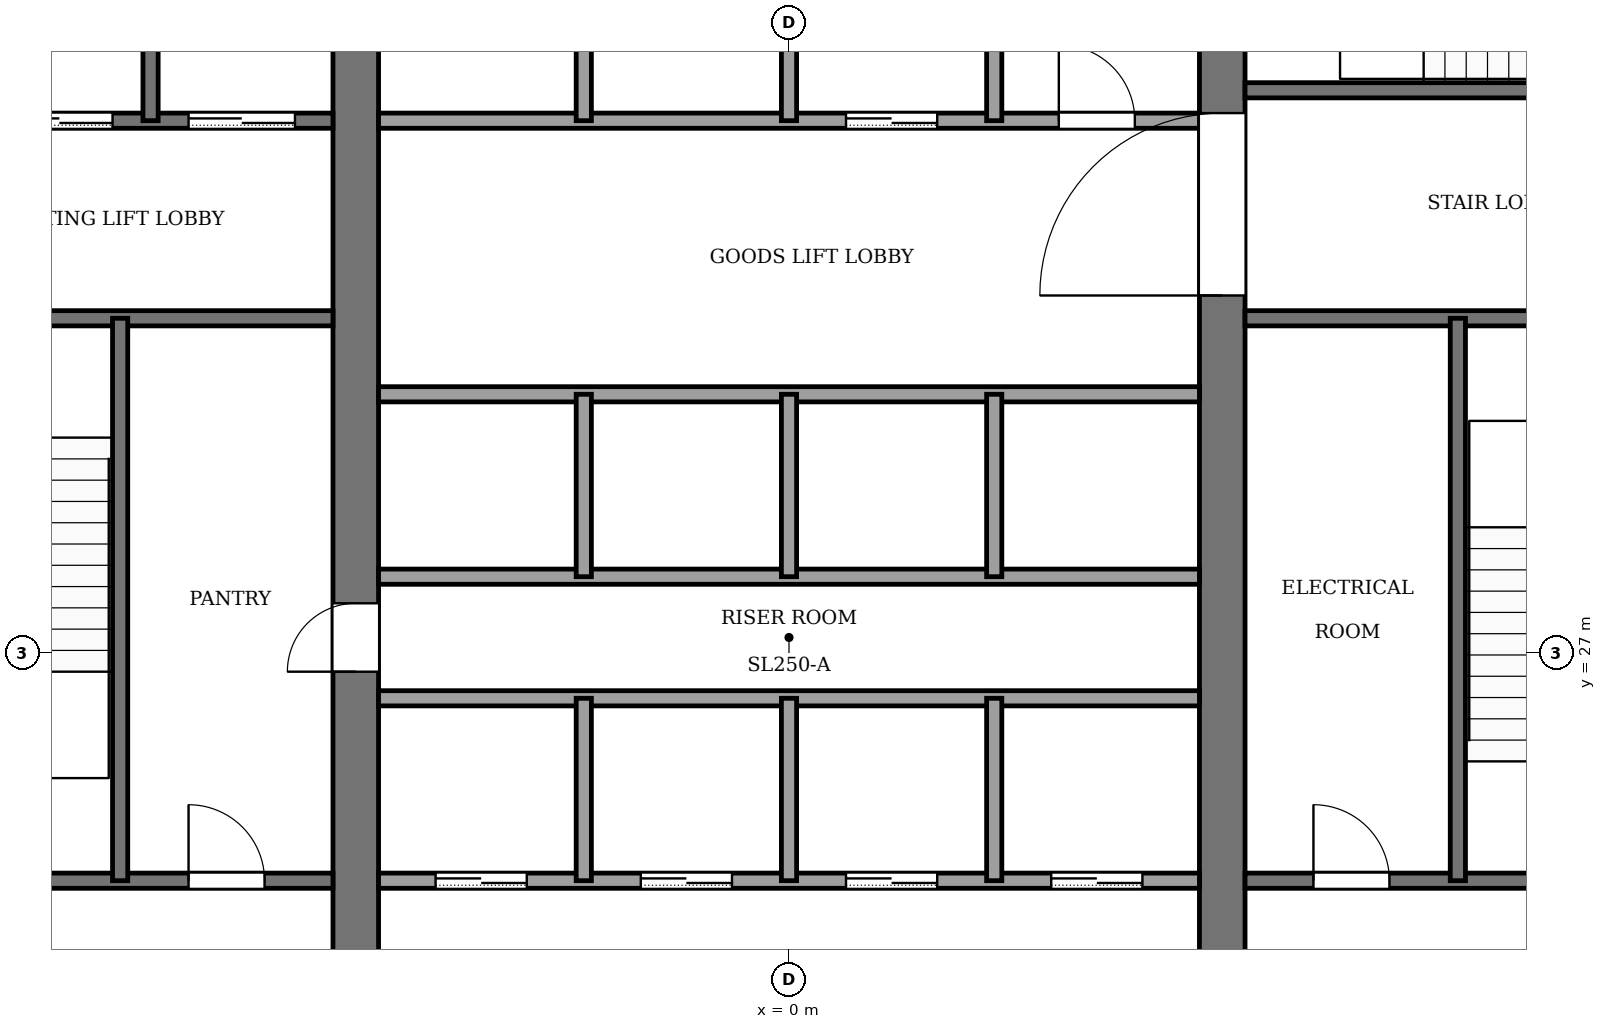
"""IFC4 building model, lengths in metres.
Left out: names, types, materials, properties, quantities, classifications, styles, units other than length and angle.
Written with IfcOpenShell. Run it as: python <this file> out.ifc"""

import sys

from ifc_helpers import new_model, si_unit, direction, frame, frame_2d, origin, place, context, subcontext, project, spatial, rectangle, extrude, element, fill, save


model = new_model("IFC4")
c1 = context("Model", 3, precision=1e-05, world=origin(), true_north=direction((0.0, 1.0)))
c2 = subcontext(c1, "Body", "Model", "MODEL_VIEW")
j1 = project(units=[si_unit("LENGTHUNIT", "METRE"), si_unit("PLANEANGLEUNIT", "RADIAN")], contexts=[c1])
p1 = place(None, origin())
s1 = spatial("IfcSite", under=j1, at=p1, CompositionType="ELEMENT")
p2 = place(p1, origin())
s2 = spatial("IfcBuilding", under=s1, at=p2, CompositionType="ELEMENT")
p3 = place(p2, frame((0.0, 0.0, 14.0)))
s3 = spatial("IfcBuildingStorey", under=s2, at=p3, CompositionType="ELEMENT", Elevation=14.0)
p4 = place(p3, frame((-5.7, 18.4, -0.13), z_axis=(0.0, 0.0, 1.0), x_axis=(0.0, 1.0, 0.0)))
e1 = element("IfcWall", 1, at=p4, inside=s3, PredefinedType="SHEAR", context=c2, shape_type="SweptSolid", body=[
    extrude(rectangle(XDim=19.2, YDim=0.6, at=frame_2d((9.6, 0.0))), origin(), (0.0, 0.0, 1.0), 4.0),
])
p5 = place(p4, frame((8.35, 0.0, 0.13)))
e2 = element("IfcOpeningElement", 2, at=p5, cuts=e1, PredefinedType="OPENING", context=c2, shape_type="SweptSolid", body=[
    extrude(rectangle(XDim=0.9, YDim=2.1, at=frame_2d((0.45, 1.05))), frame((0.0, 0.31, 0.0), z_axis=(0.0, -1.0, 0.0), x_axis=(1.0, 0.0, 0.0)), (0.0, 0.0, 1.0), 0.62),
])
p6 = place(p3, frame((5.7, 18.4, -0.13), z_axis=(0.0, 0.0, 1.0), x_axis=(0.0, 1.0, 0.0)))
e3 = element("IfcWall", 3, at=p6, inside=s3, PredefinedType="SHEAR", context=c2, shape_type="SweptSolid", body=[
    extrude(rectangle(XDim=19.2, YDim=0.6, at=frame_2d((9.6, 0.0))), origin(), (0.0, 0.0, 1.0), 4.0),
])
p7 = place(p6, frame((13.3, 0.0, 0.13)))
e4 = element("IfcOpeningElement", 4, at=p7, cuts=e3, PredefinedType="OPENING", context=c2, shape_type="SweptSolid", body=[
    extrude(rectangle(XDim=2.4, YDim=2.4, at=frame_2d((1.2, 1.2))), frame((0.0, 0.31, 0.0), z_axis=(0.0, -1.0, 0.0), x_axis=(1.0, 0.0, 0.0)), (0.0, 0.0, 1.0), 0.62),
])
p8 = place(p3, frame((-12.6, 24.0, 0.0), z_axis=(0.0, 0.0, 1.0), x_axis=(1.0, 0.0, 0.0)))
e5 = element("IfcWall", 5, at=p8, inside=s3, PredefinedType="PARTITIONING", context=c2, shape_type="SweptSolid", body=[
    extrude(rectangle(XDim=6.6, YDim=0.2, at=frame_2d((3.3, 0.0))), origin(), (0.0, 0.0, 1.0), 3.87),
])
p9 = place(p8, frame((4.7, 0.0, 0.0)))
e6 = element("IfcOpeningElement", 6, at=p9, cuts=e5, PredefinedType="OPENING", context=c2, shape_type="SweptSolid", body=[
    extrude(rectangle(XDim=1.0, YDim=2.1, at=frame_2d((0.5, 1.05))), frame((0.0, 0.11, 0.0), z_axis=(0.0, -1.0, 0.0), x_axis=(1.0, 0.0, 0.0)), (0.0, 0.0, 1.0), 0.22),
])
p10 = place(p3, frame((-5.4, 24.0, 0.0), z_axis=(0.0, 0.0, 1.0), x_axis=(1.0, 0.0, 0.0)))
e7 = element("IfcWall", 7, at=p10, inside=s3, PredefinedType="PARTITIONING", context=c2, shape_type="SweptSolid", body=[
    extrude(rectangle(XDim=10.8, YDim=0.2, at=frame_2d((5.4, 0.0))), origin(), (0.0, 0.0, 1.0), 3.87),
])
p11 = place(p10, frame((0.75, 0.0, 0.0)))
e8 = element("IfcOpeningElement", 8, at=p11, cuts=e7, PredefinedType="OPENING", context=c2, shape_type="SweptSolid", body=[
    extrude(rectangle(XDim=1.2, YDim=2.2, at=frame_2d((0.6, 1.1))), frame((0.0, 0.11, 0.0), z_axis=(0.0, -1.0, 0.0), x_axis=(1.0, 0.0, 0.0)), (0.0, 0.0, 1.0), 0.22),
])
p12 = place(p10, frame((3.45, 0.0, 0.0)))
e9 = element("IfcOpeningElement", 9, at=p12, cuts=e7, PredefinedType="OPENING", context=c2, shape_type="SweptSolid", body=[
    extrude(rectangle(XDim=1.2, YDim=2.2, at=frame_2d((0.6, 1.1))), frame((0.0, 0.11, 0.0), z_axis=(0.0, -1.0, 0.0), x_axis=(1.0, 0.0, 0.0)), (0.0, 0.0, 1.0), 0.22),
])
p13 = place(p10, frame((6.15, 0.0, 0.0)))
e10 = element("IfcOpeningElement", 10, at=p13, cuts=e7, PredefinedType="OPENING", context=c2, shape_type="SweptSolid", body=[
    extrude(rectangle(XDim=1.2, YDim=2.2, at=frame_2d((0.6, 1.1))), frame((0.0, 0.11, 0.0), z_axis=(0.0, -1.0, 0.0), x_axis=(1.0, 0.0, 0.0)), (0.0, 0.0, 1.0), 0.22),
])
p14 = place(p10, frame((8.85, 0.0, 0.0)))
e11 = element("IfcOpeningElement", 11, at=p14, cuts=e7, PredefinedType="OPENING", context=c2, shape_type="SweptSolid", body=[
    extrude(rectangle(XDim=1.2, YDim=2.2, at=frame_2d((0.6, 1.1))), frame((0.0, 0.11, 0.0), z_axis=(0.0, -1.0, 0.0), x_axis=(1.0, 0.0, 0.0)), (0.0, 0.0, 1.0), 0.22),
])
p15 = place(p3, frame((6.0, 24.0, 0.0), z_axis=(0.0, 0.0, 1.0), x_axis=(1.0, 0.0, 0.0)))
e12 = element("IfcWall", 12, at=p15, inside=s3, PredefinedType="PARTITIONING", context=c2, shape_type="SweptSolid", body=[
    extrude(rectangle(XDim=6.6, YDim=0.2, at=frame_2d((3.3, 0.0))), origin(), (0.0, 0.0, 1.0), 3.87),
])
p16 = place(p15, frame((0.9, 0.0, 0.0)))
e13 = element("IfcOpeningElement", 13, at=p16, cuts=e12, PredefinedType="OPENING", context=c2, shape_type="SweptSolid", body=[
    extrude(rectangle(XDim=1.0, YDim=2.1, at=frame_2d((0.5, 1.05))), frame((0.0, 0.11, 0.0), z_axis=(0.0, -1.0, 0.0), x_axis=(1.0, 0.0, 0.0)), (0.0, 0.0, 1.0), 0.22),
])
p17 = place(p15, frame((4.4, 0.0, 0.0)))
e14 = element("IfcOpeningElement", 14, at=p17, cuts=e12, PredefinedType="OPENING", context=c2, shape_type="SweptSolid", body=[
    extrude(rectangle(XDim=1.2, YDim=2.2, at=frame_2d((0.6, 1.1))), frame((0.0, 0.11, 0.0), z_axis=(0.0, -1.0, 0.0), x_axis=(1.0, 0.0, 0.0)), (0.0, 0.0, 1.0), 0.22),
])
for number, where, z_axis, x_axis in (
    (15, (-5.4, 26.4, 0.0), (0.0, 0.0, 1.0), (1.0, 0.0, 0.0)),
    (16, (-5.4, 28.0, 0.0), (0.0, 0.0, 1.0), (1.0, 0.0, 0.0)),
    (17, (-5.4, 30.4, 0.0), (0.0, 0.0, 1.0), (1.0, 0.0, 0.0)),
):
    element("IfcWall", number, at=place(p3, frame(where, z_axis=z_axis, x_axis=x_axis)), inside=s3, PredefinedType="PARTITIONING", context=c2, shape_type="SweptSolid", body=[
        extrude(rectangle(XDim=10.8, YDim=0.2, at=frame_2d((5.4, 0.0))), origin(), (0.0, 0.0, 1.0), 3.87),
    ])
p18 = place(p3, frame((-12.6, 31.4, 0.0), z_axis=(0.0, 0.0, 1.0), x_axis=(1.0, 0.0, 0.0)))
e18 = element("IfcWall", 18, at=p18, inside=s3, PredefinedType="PARTITIONING", context=c2, shape_type="SweptSolid", body=[
    extrude(rectangle(XDim=6.6, YDim=0.2, at=frame_2d((3.3, 0.0))), origin(), (0.0, 0.0, 1.0), 3.87),
])
p19 = place(p18, frame((1.0, 0.0, 0.0)))
e19 = element("IfcOpeningElement", 19, at=p19, cuts=e18, PredefinedType="OPENING", context=c2, shape_type="SweptSolid", body=[
    extrude(rectangle(XDim=1.2, YDim=2.2, at=frame_2d((0.6, 1.1))), frame((0.0, 0.11, 0.0), z_axis=(0.0, -1.0, 0.0), x_axis=(1.0, 0.0, 0.0)), (0.0, 0.0, 1.0), 0.22),
])
p20 = place(p3, frame((6.0, 31.4, 0.0), z_axis=(0.0, 0.0, 1.0), x_axis=(1.0, 0.0, 0.0)))
e20 = element("IfcWall", 20, at=p20, inside=s3, PredefinedType="PARTITIONING", context=c2, shape_type="SweptSolid", body=[
    extrude(rectangle(XDim=6.6, YDim=0.2, at=frame_2d((3.3, 0.0))), origin(), (0.0, 0.0, 1.0), 3.87),
])
p21 = place(p3, frame((-12.6, 34.0, 0.0), z_axis=(0.0, 0.0, 1.0), x_axis=(1.0, 0.0, 0.0)))
e21 = element("IfcWall", 21, at=p21, inside=s3, PredefinedType="PARTITIONING", context=c2, shape_type="SweptSolid", body=[
    extrude(rectangle(XDim=6.6, YDim=0.2, at=frame_2d((3.3, 0.0))), origin(), (0.0, 0.0, 1.0), 3.87),
])
p22 = place(p21, frame((4.7, 0.0, 0.0)))
e22 = element("IfcOpeningElement", 22, at=p22, cuts=e21, PredefinedType="OPENING", context=c2, shape_type="SweptSolid", body=[
    extrude(rectangle(XDim=1.4, YDim=2.2, at=frame_2d((0.7, 1.1))), frame((0.0, 0.11, 0.0), z_axis=(0.0, -1.0, 0.0), x_axis=(1.0, 0.0, 0.0)), (0.0, 0.0, 1.0), 0.22),
])
p23 = place(p21, frame((2.3, 0.0, 0.0)))
e23 = element("IfcOpeningElement", 23, at=p23, cuts=e21, PredefinedType="OPENING", context=c2, shape_type="SweptSolid", body=[
    extrude(rectangle(XDim=1.4, YDim=2.2, at=frame_2d((0.7, 1.1))), frame((0.0, 0.11, 0.0), z_axis=(0.0, -1.0, 0.0), x_axis=(1.0, 0.0, 0.0)), (0.0, 0.0, 1.0), 0.22),
])
p24 = place(p21, frame((0.45, 0.0, 0.0)))
e24 = element("IfcOpeningElement", 24, at=p24, cuts=e21, PredefinedType="OPENING", context=c2, shape_type="SweptSolid", body=[
    extrude(rectangle(XDim=0.9, YDim=2.1, at=frame_2d((0.45, 1.05))), frame((0.0, 0.11, 0.0), z_axis=(0.0, -1.0, 0.0), x_axis=(1.0, 0.0, 0.0)), (0.0, 0.0, 1.0), 0.22),
])
p25 = place(p3, frame((-5.4, 34.0, 0.0), z_axis=(0.0, 0.0, 1.0), x_axis=(1.0, 0.0, 0.0)))
e25 = element("IfcWall", 25, at=p25, inside=s3, PredefinedType="PARTITIONING", context=c2, shape_type="SweptSolid", body=[
    extrude(rectangle(XDim=10.8, YDim=0.2, at=frame_2d((5.4, 0.0))), origin(), (0.0, 0.0, 1.0), 3.87),
])
p26 = place(p25, frame((6.15, 0.0, 0.0)))
e26 = element("IfcOpeningElement", 26, at=p26, cuts=e25, PredefinedType="OPENING", context=c2, shape_type="SweptSolid", body=[
    extrude(rectangle(XDim=1.2, YDim=2.2, at=frame_2d((0.6, 1.1))), frame((0.0, 0.11, 0.0), z_axis=(0.0, -1.0, 0.0), x_axis=(1.0, 0.0, 0.0)), (0.0, 0.0, 1.0), 0.22),
])
p27 = place(p25, frame((8.95, 0.0, 0.0)))
e27 = element("IfcOpeningElement", 27, at=p27, cuts=e25, PredefinedType="OPENING", context=c2, shape_type="SweptSolid", body=[
    extrude(rectangle(XDim=1.0, YDim=2.1, at=frame_2d((0.5, 1.05))), frame((0.0, 0.11, 0.0), z_axis=(0.0, -1.0, 0.0), x_axis=(1.0, 0.0, 0.0)), (0.0, 0.0, 1.0), 0.22),
])
p28 = place(p3, frame((6.0, 34.4, 0.0), z_axis=(0.0, 0.0, 1.0), x_axis=(1.0, 0.0, 0.0)))
e28 = element("IfcWall", 28, at=p28, inside=s3, PredefinedType="PARTITIONING", context=c2, shape_type="SweptSolid", body=[
    extrude(rectangle(XDim=6.6, YDim=0.2, at=frame_2d((3.3, 0.0))), origin(), (0.0, 0.0, 1.0), 3.87),
])
p29 = place(p28, frame((4.8, 0.0, 0.0)))
e29 = element("IfcOpeningElement", 29, at=p29, cuts=e28, PredefinedType="OPENING", context=c2, shape_type="SweptSolid", body=[
    extrude(rectangle(XDim=1.2, YDim=2.2, at=frame_2d((0.6, 1.1))), frame((0.0, 0.11, 0.0), z_axis=(0.0, -1.0, 0.0), x_axis=(1.0, 0.0, 0.0)), (0.0, 0.0, 1.0), 0.22),
])
p30 = place(p3, frame((-8.8, 24.0, 0.0), z_axis=(0.0, 0.0, 1.0), x_axis=(0.0, 1.0, 0.0)))
e30 = element("IfcWall", 30, at=p30, inside=s3, PredefinedType="PARTITIONING", context=c2, shape_type="SweptSolid", body=[
    extrude(rectangle(XDim=7.4, YDim=0.2, at=frame_2d((3.7, 0.0))), origin(), (0.0, 0.0, 1.0), 3.87),
])
p31 = place(p3, frame((-8.4, 34.0, 0.0), z_axis=(0.0, 0.0, 1.0), x_axis=(0.0, 1.0, 0.0)))
e31 = element("IfcWall", 31, at=p31, inside=s3, PredefinedType="PARTITIONING", context=c2, shape_type="SweptSolid", body=[
    extrude(rectangle(XDim=3.6, YDim=0.2, at=frame_2d((1.8, 0.0))), origin(), (0.0, 0.0, 1.0), 3.87),
])
for number, where, z_axis, x_axis in (
    (32, (-2.7, 24.0, 0.0), (0.0, 0.0, 1.0), (0.0, 1.0, 0.0)),
    (33, (-2.7, 28.0, 0.0), (0.0, 0.0, 1.0), (0.0, 1.0, 0.0)),
):
    element("IfcWall", number, at=place(p3, frame(where, z_axis=z_axis, x_axis=x_axis)), inside=s3, PredefinedType="PARTITIONING", context=c2, shape_type="SweptSolid", body=[
        extrude(rectangle(XDim=2.4, YDim=0.2, at=frame_2d((1.2, 0.0))), origin(), (0.0, 0.0, 1.0), 3.87),
    ])
p32 = place(p3, frame((-2.7, 34.0, 0.0), z_axis=(0.0, 0.0, 1.0), x_axis=(0.0, 1.0, 0.0)))
e34 = element("IfcWall", 34, at=p32, inside=s3, PredefinedType="PARTITIONING", context=c2, shape_type="SweptSolid", body=[
    extrude(rectangle(XDim=3.6, YDim=0.2, at=frame_2d((1.8, 0.0))), origin(), (0.0, 0.0, 1.0), 3.87),
])
for number, where, z_axis, x_axis in (
    (35, (0.0, 24.0, 0.0), (0.0, 0.0, 1.0), (0.0, 1.0, 0.0)),
    (36, (0.0, 28.0, 0.0), (0.0, 0.0, 1.0), (0.0, 1.0, 0.0)),
):
    element("IfcWall", number, at=place(p3, frame(where, z_axis=z_axis, x_axis=x_axis)), inside=s3, PredefinedType="PARTITIONING", context=c2, shape_type="SweptSolid", body=[
        extrude(rectangle(XDim=2.4, YDim=0.2, at=frame_2d((1.2, 0.0))), origin(), (0.0, 0.0, 1.0), 3.87),
    ])
p33 = place(p3, frame((0.0, 34.0, 0.0), z_axis=(0.0, 0.0, 1.0), x_axis=(0.0, 1.0, 0.0)))
e37 = element("IfcWall", 37, at=p33, inside=s3, PredefinedType="PARTITIONING", context=c2, shape_type="SweptSolid", body=[
    extrude(rectangle(XDim=3.6, YDim=0.2, at=frame_2d((1.8, 0.0))), origin(), (0.0, 0.0, 1.0), 3.87),
])
for number, where, z_axis, x_axis in (
    (38, (2.7, 24.0, 0.0), (0.0, 0.0, 1.0), (0.0, 1.0, 0.0)),
    (39, (2.7, 28.0, 0.0), (0.0, 0.0, 1.0), (0.0, 1.0, 0.0)),
):
    element("IfcWall", number, at=place(p3, frame(where, z_axis=z_axis, x_axis=x_axis)), inside=s3, PredefinedType="PARTITIONING", context=c2, shape_type="SweptSolid", body=[
        extrude(rectangle(XDim=2.4, YDim=0.2, at=frame_2d((1.2, 0.0))), origin(), (0.0, 0.0, 1.0), 3.87),
    ])
p34 = place(p3, frame((2.7, 34.0, 0.0), z_axis=(0.0, 0.0, 1.0), x_axis=(0.0, 1.0, 0.0)))
e40 = element("IfcWall", 40, at=p34, inside=s3, PredefinedType="PARTITIONING", context=c2, shape_type="SweptSolid", body=[
    extrude(rectangle(XDim=3.6, YDim=0.2, at=frame_2d((1.8, 0.0))), origin(), (0.0, 0.0, 1.0), 3.87),
])
p35 = place(p3, frame((8.8, 24.0, 0.0), z_axis=(0.0, 0.0, 1.0), x_axis=(0.0, 1.0, 0.0)))
e41 = element("IfcWall", 41, at=p35, inside=s3, PredefinedType="PARTITIONING", context=c2, shape_type="SweptSolid", body=[
    extrude(rectangle(XDim=7.4, YDim=0.2, at=frame_2d((3.7, 0.0))), origin(), (0.0, 0.0, 1.0), 3.87),
])
p36 = place(p11, origin())
e42 = element("IfcDoor", 42, at=p36, inside=s3, OperationType="SLIDING_TO_LEFT", PredefinedType="DOOR", context=c2, shape_type="SweptSolid", body=[
    extrude(rectangle(XDim=1.2, YDim=2.2, at=frame_2d((0.6, 1.1))), frame((0.0, 0.025, 0.0), z_axis=(0.0, -1.0, 0.0), x_axis=(1.0, 0.0, 0.0)), (0.0, 0.0, 1.0), 0.05),
])
fill(e8, e42)
p37 = place(p12, origin())
e43 = element("IfcDoor", 43, at=p37, inside=s3, OperationType="SLIDING_TO_LEFT", PredefinedType="DOOR", context=c2, shape_type="SweptSolid", body=[
    extrude(rectangle(XDim=1.2, YDim=2.2, at=frame_2d((0.6, 1.1))), frame((0.0, 0.025, 0.0), z_axis=(0.0, -1.0, 0.0), x_axis=(1.0, 0.0, 0.0)), (0.0, 0.0, 1.0), 0.05),
])
fill(e9, e43)
p38 = place(p13, origin())
e44 = element("IfcDoor", 44, at=p38, inside=s3, OperationType="SLIDING_TO_LEFT", PredefinedType="DOOR", context=c2, shape_type="SweptSolid", body=[
    extrude(rectangle(XDim=1.2, YDim=2.2, at=frame_2d((0.6, 1.1))), frame((0.0, 0.025, 0.0), z_axis=(0.0, -1.0, 0.0), x_axis=(1.0, 0.0, 0.0)), (0.0, 0.0, 1.0), 0.05),
])
fill(e10, e44)
p39 = place(p14, origin())
e45 = element("IfcDoor", 45, at=p39, inside=s3, OperationType="SLIDING_TO_LEFT", PredefinedType="DOOR", context=c2, shape_type="SweptSolid", body=[
    extrude(rectangle(XDim=1.2, YDim=2.2, at=frame_2d((0.6, 1.1))), frame((0.0, 0.025, 0.0), z_axis=(0.0, -1.0, 0.0), x_axis=(1.0, 0.0, 0.0)), (0.0, 0.0, 1.0), 0.05),
])
fill(e11, e45)
p40 = place(p26, origin())
e46 = element("IfcDoor", 46, at=p40, inside=s3, OperationType="SLIDING_TO_LEFT", PredefinedType="DOOR", context=c2, shape_type="SweptSolid", body=[
    extrude(rectangle(XDim=1.2, YDim=2.2, at=frame_2d((0.6, 1.1))), frame((0.0, 0.025, 0.0), z_axis=(0.0, -1.0, 0.0), x_axis=(1.0, 0.0, 0.0)), (0.0, 0.0, 1.0), 0.05),
])
fill(e26, e46)
p41 = place(p22, origin())
e47 = element("IfcDoor", 47, at=p41, inside=s3, OperationType="SLIDING_TO_LEFT", PredefinedType="DOOR", context=c2, shape_type="SweptSolid", body=[
    extrude(rectangle(XDim=1.4, YDim=2.2, at=frame_2d((0.7, 1.1))), frame((0.0, 0.025, 0.0), z_axis=(0.0, -1.0, 0.0), x_axis=(1.0, 0.0, 0.0)), (0.0, 0.0, 1.0), 0.05),
])
fill(e22, e47)
p42 = place(p23, origin())
e48 = element("IfcDoor", 48, at=p42, inside=s3, OperationType="SLIDING_TO_LEFT", PredefinedType="DOOR", context=c2, shape_type="SweptSolid", body=[
    extrude(rectangle(XDim=1.4, YDim=2.2, at=frame_2d((0.7, 1.1))), frame((0.0, 0.025, 0.0), z_axis=(0.0, -1.0, 0.0), x_axis=(1.0, 0.0, 0.0)), (0.0, 0.0, 1.0), 0.05),
])
fill(e23, e48)
p43 = place(p9, origin())
e49 = element("IfcDoor", 49, at=p43, inside=s3, OperationType="SINGLE_SWING_RIGHT", PredefinedType="DOOR", context=c2, shape_type="SweptSolid", body=[
    extrude(rectangle(XDim=1.0, YDim=2.1, at=frame_2d((0.5, 1.05))), frame((0.0, 0.025, 0.0), z_axis=(0.0, -1.0, 0.0), x_axis=(1.0, 0.0, 0.0)), (0.0, 0.0, 1.0), 0.05),
])
fill(e6, e49)
p44 = place(p16, origin())
e50 = element("IfcDoor", 50, at=p44, inside=s3, OperationType="SINGLE_SWING_LEFT", PredefinedType="DOOR", context=c2, shape_type="SweptSolid", body=[
    extrude(rectangle(XDim=1.0, YDim=2.1, at=frame_2d((0.5, 1.05))), frame((0.0, 0.025, 0.0), z_axis=(0.0, -1.0, 0.0), x_axis=(1.0, 0.0, 0.0)), (0.0, 0.0, 1.0), 0.05),
])
fill(e13, e50)
p45 = place(p27, origin())
e51 = element("IfcDoor", 51, at=p45, inside=s3, OperationType="SINGLE_SWING_LEFT", PredefinedType="DOOR", context=c2, shape_type="SweptSolid", body=[
    extrude(rectangle(XDim=1.0, YDim=2.1, at=frame_2d((0.5, 1.05))), frame((0.0, 0.025, 0.0), z_axis=(0.0, -1.0, 0.0), x_axis=(1.0, 0.0, 0.0)), (0.0, 0.0, 1.0), 0.05),
])
fill(e27, e51)
p46 = place(p5, origin())
e52 = element("IfcDoor", 52, at=p46, inside=s3, OperationType="SINGLE_SWING_RIGHT", PredefinedType="DOOR", context=c2, shape_type="SweptSolid", body=[
    extrude(rectangle(XDim=0.9, YDim=2.1, at=frame_2d((0.45, 1.05))), frame((0.0, 0.025, 0.0), z_axis=(0.0, -1.0, 0.0), x_axis=(1.0, 0.0, 0.0)), (0.0, 0.0, 1.0), 0.05),
])
fill(e2, e52)
p47 = place(p7, origin())
e53 = element("IfcDoor", 53, at=p47, inside=s3, OperationType="DOUBLE_DOOR_SINGLE_SWING", PredefinedType="DOOR", context=c2, shape_type="SweptSolid", body=[
    extrude(rectangle(XDim=2.4, YDim=2.4, at=frame_2d((1.2, 1.2))), frame((0.0, 0.025, 0.0), z_axis=(0.0, -1.0, 0.0), x_axis=(1.0, 0.0, 0.0)), (0.0, 0.0, 1.0), 0.05),
])
fill(e4, e53)
save(model, sys.argv[1])
